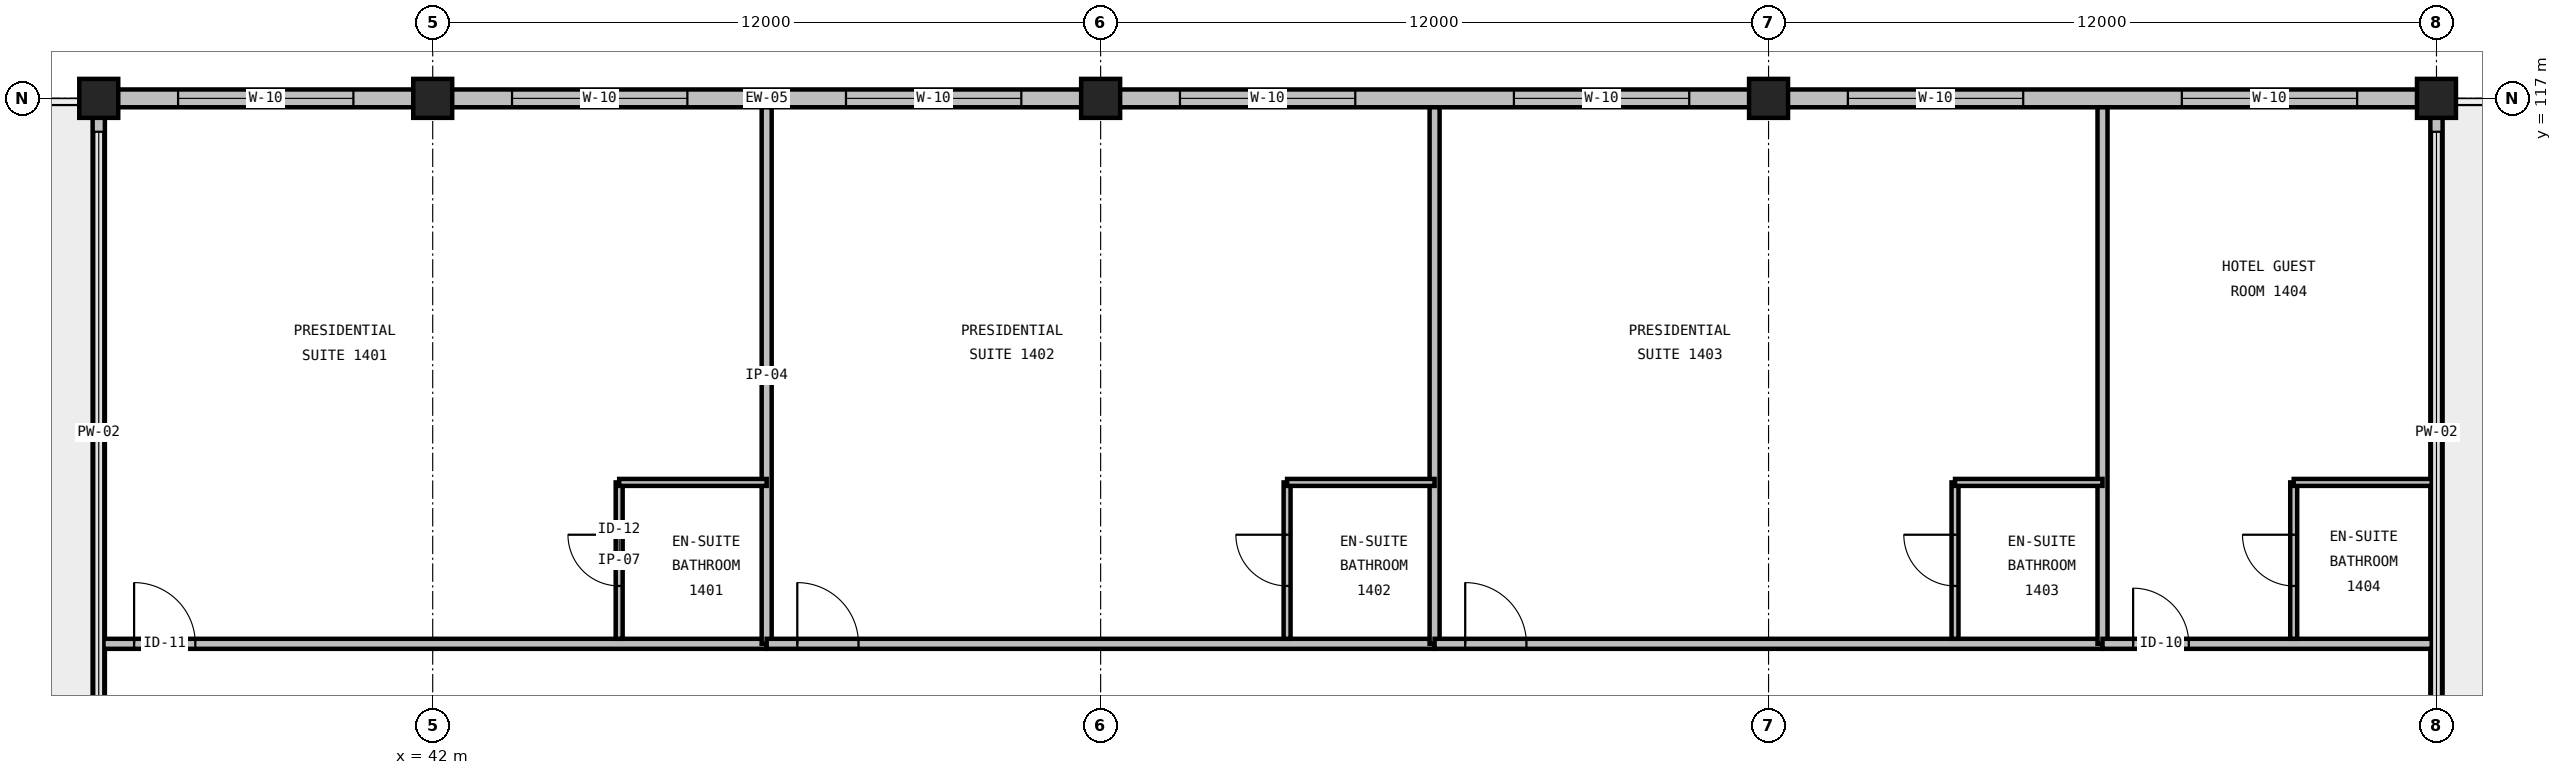
"""IFC4 building model, lengths in metres.
Left out: names, types, materials, properties, quantities, classifications, styles, units other than length and angle.
Written with IfcOpenShell. Run it as: python <this file> out.ifc"""

import sys

from ifc_helpers import new_model, si_unit, direction, frame, frame_2d, origin, origin_2d, place, context, subcontext, project, spatial, rectangle, extrude, element, fill, save


model = new_model("IFC4")
c1 = context("Model", 3, precision=1e-05, world=origin(), true_north=direction((0.0, 1.0)))
c2 = subcontext(c1, "Body", "Model", "MODEL_VIEW")
j1 = project(units=[si_unit("LENGTHUNIT", "METRE"), si_unit("PLANEANGLEUNIT", "RADIAN")], contexts=[c1])
p1 = place(None, origin())
s1 = spatial("IfcSite", under=j1, at=p1, CompositionType="ELEMENT")
p2 = place(p1, origin())
s2 = spatial("IfcBuilding", under=s1, at=p2, CompositionType="ELEMENT")
p3 = place(p2, frame((0.0, 0.0, 60.0)))
s3 = spatial("IfcBuildingStorey", under=s2, at=p3, CompositionType="ELEMENT", Elevation=60.0)
for number, where, z_axis, x_axis in (
    (1, (36.0, 117.0, 0.0), (0.0, 0.0, 1.0), (1.0, 0.0, 0.0)),
    (2, (42.0, 117.0, 0.0), (0.0, 0.0, 1.0), (1.0, 0.0, 0.0)),
    (3, (54.0, 117.0, 0.0), (0.0, 0.0, 1.0), (1.0, 0.0, 0.0)),
    (4, (66.0, 117.0, 0.0), (0.0, 0.0, 1.0), (1.0, 0.0, 0.0)),
    (5, (78.0, 117.0, 0.0), (0.0, 0.0, 1.0), (1.0, 0.0, 0.0)),
):
    element("IfcColumn", number, at=place(p3, frame(where, z_axis=z_axis, x_axis=x_axis)), inside=s3, PredefinedType="COLUMN", context=c2, shape_type="SweptSolid", body=[
        extrude(rectangle(XDim=0.7, YDim=0.7, at=origin_2d()), origin(), (0.0, 0.0, 1.0), 3.6),
    ])
p4 = place(p3, frame((42.0, 117.0, 0.0), z_axis=(0.0, 0.0, 1.0), x_axis=(-1.0, 0.0, 0.0)))
e6 = element("IfcWall", 6, at=p4, inside=s3, PredefinedType="STANDARD", context=c2, shape_type="SweptSolid", body=[
    extrude(rectangle(XDim=6.0, YDim=0.32, at=frame_2d((3.0, 0.0))), origin(), (0.0, 0.0, 1.0), 2.536),
])
p5 = place(p4, frame((1.425, 0.0, 0.65)))
e7 = element("IfcOpeningElement", 7, at=p5, cuts=e6, PredefinedType="OPENING", context=c2, shape_type="SweptSolid", body=[
    extrude(rectangle(XDim=3.15, YDim=1.75, at=frame_2d((1.575, 0.875))), frame((0.0, 0.175, 0.0), z_axis=(0.0, -1.0, 0.0), x_axis=(1.0, 0.0, 0.0)), (0.0, 0.0, 1.0), 0.35),
])
p6 = place(p3, frame((54.0, 117.0, 0.0), z_axis=(0.0, 0.0, 1.0), x_axis=(-1.0, 0.0, 0.0)))
e8 = element("IfcWall", 8, at=p6, inside=s3, PredefinedType="STANDARD", context=c2, shape_type="SweptSolid", body=[
    extrude(rectangle(XDim=12.0, YDim=0.32, at=frame_2d((6.0, 0.0))), origin(), (0.0, 0.0, 1.0), 2.536),
])
p7 = place(p6, frame((1.425, 0.0, 0.65)))
e9 = element("IfcOpeningElement", 9, at=p7, cuts=e8, PredefinedType="OPENING", context=c2, shape_type="SweptSolid", body=[
    extrude(rectangle(XDim=3.15, YDim=1.75, at=frame_2d((1.575, 0.875))), frame((0.0, 0.175, 0.0), z_axis=(0.0, -1.0, 0.0), x_axis=(1.0, 0.0, 0.0)), (0.0, 0.0, 1.0), 0.35),
])
p8 = place(p6, frame((7.425, 0.0, 0.65)))
e10 = element("IfcOpeningElement", 10, at=p8, cuts=e8, PredefinedType="OPENING", context=c2, shape_type="SweptSolid", body=[
    extrude(rectangle(XDim=3.15, YDim=1.75, at=frame_2d((1.575, 0.875))), frame((0.0, 0.175, 0.0), z_axis=(0.0, -1.0, 0.0), x_axis=(1.0, 0.0, 0.0)), (0.0, 0.0, 1.0), 0.35),
])
p9 = place(p3, frame((66.0, 117.0, 0.0), z_axis=(0.0, 0.0, 1.0), x_axis=(-1.0, 0.0, 0.0)))
e11 = element("IfcWall", 11, at=p9, inside=s3, PredefinedType="STANDARD", context=c2, shape_type="SweptSolid", body=[
    extrude(rectangle(XDim=12.0, YDim=0.32, at=frame_2d((6.0, 0.0))), origin(), (0.0, 0.0, 1.0), 2.536),
])
p10 = place(p9, frame((1.425, 0.0, 0.65)))
e12 = element("IfcOpeningElement", 12, at=p10, cuts=e11, PredefinedType="OPENING", context=c2, shape_type="SweptSolid", body=[
    extrude(rectangle(XDim=3.15, YDim=1.75, at=frame_2d((1.575, 0.875))), frame((0.0, 0.175, 0.0), z_axis=(0.0, -1.0, 0.0), x_axis=(1.0, 0.0, 0.0)), (0.0, 0.0, 1.0), 0.35),
])
p11 = place(p9, frame((7.425, 0.0, 0.65)))
e13 = element("IfcOpeningElement", 13, at=p11, cuts=e11, PredefinedType="OPENING", context=c2, shape_type="SweptSolid", body=[
    extrude(rectangle(XDim=3.15, YDim=1.75, at=frame_2d((1.575, 0.875))), frame((0.0, 0.175, 0.0), z_axis=(0.0, -1.0, 0.0), x_axis=(1.0, 0.0, 0.0)), (0.0, 0.0, 1.0), 0.35),
])
p12 = place(p3, frame((78.0, 117.0, 0.0), z_axis=(0.0, 0.0, 1.0), x_axis=(-1.0, 0.0, 0.0)))
e14 = element("IfcWall", 14, at=p12, inside=s3, PredefinedType="STANDARD", context=c2, shape_type="SweptSolid", body=[
    extrude(rectangle(XDim=12.0, YDim=0.32, at=frame_2d((6.0, 0.0))), origin(), (0.0, 0.0, 1.0), 2.536),
])
p13 = place(p12, frame((1.425, 0.0, 0.65)))
e15 = element("IfcOpeningElement", 15, at=p13, cuts=e14, PredefinedType="OPENING", context=c2, shape_type="SweptSolid", body=[
    extrude(rectangle(XDim=3.15, YDim=1.75, at=frame_2d((1.575, 0.875))), frame((0.0, 0.175, 0.0), z_axis=(0.0, -1.0, 0.0), x_axis=(1.0, 0.0, 0.0)), (0.0, 0.0, 1.0), 0.35),
])
p14 = place(p12, frame((7.425, 0.0, 0.65)))
e16 = element("IfcOpeningElement", 16, at=p14, cuts=e14, PredefinedType="OPENING", context=c2, shape_type="SweptSolid", body=[
    extrude(rectangle(XDim=3.15, YDim=1.75, at=frame_2d((1.575, 0.875))), frame((0.0, 0.175, 0.0), z_axis=(0.0, -1.0, 0.0), x_axis=(1.0, 0.0, 0.0)), (0.0, 0.0, 1.0), 0.35),
])
for number, where, z_axis, x_axis in (
    (17, (36.0, 117.0, 0.0), (0.0, 0.0, 1.0), (0.0, -1.0, 0.0)),
    (18, (78.0, 105.0, 0.0), (0.0, 0.0, 1.0), (0.0, 1.0, 0.0)),
):
    element("IfcWall", number, at=place(p3, frame(where, z_axis=z_axis, x_axis=x_axis)), inside=s3, PredefinedType="PARAPET", context=c2, shape_type="SweptSolid", body=[
        extrude(rectangle(XDim=12.0, YDim=0.22, at=frame_2d((6.0, 0.0))), origin(), (0.0, 0.0, 1.0), 0.2),
    ])
p15 = place(p3, frame((36.085, 107.2, 0.0), z_axis=(0.0, 0.0, 1.0), x_axis=(1.0, 0.0, 0.0)))
e19 = element("IfcWall", 19, at=p15, inside=s3, PredefinedType="PARTITIONING", context=c2, shape_type="SweptSolid", body=[
    extrude(rectangle(XDim=11.915, YDim=0.18, at=frame_2d((5.957, 0.0))), origin(), (0.0, 0.0, 1.0), 3.29),
])
p16 = place(p15, frame((0.55, 0.0, 0.0)))
e20 = element("IfcOpeningElement", 20, at=p16, cuts=e19, PredefinedType="OPENING", context=c2, shape_type="SweptSolid", body=[
    extrude(rectangle(XDim=1.1, YDim=2.2, at=frame_2d((0.55, 1.1))), frame((0.0, 0.105, 0.0), z_axis=(0.0, -1.0, 0.0), x_axis=(1.0, 0.0, 0.0)), (0.0, 0.0, 1.0), 0.21),
])
p17 = place(p3, frame((48.0, 107.2, 0.0), z_axis=(0.0, 0.0, 1.0), x_axis=(0.0, 1.0, 0.0)))
e21 = element("IfcWall", 21, at=p17, inside=s3, PredefinedType="PARTITIONING", context=c2, shape_type="SweptSolid", body=[
    extrude(rectangle(XDim=9.64, YDim=0.18, at=frame_2d((4.82, 0.0))), origin(), (0.0, 0.0, 1.0), 3.29),
])
p18 = place(p3, frame((45.35, 107.29, 0.0), z_axis=(0.0, 0.0, 1.0), x_axis=(0.0, 1.0, 0.0)))
e22 = element("IfcWall", 22, at=p18, inside=s3, PredefinedType="PARTITIONING", context=c2, shape_type="SweptSolid", body=[
    extrude(rectangle(XDim=2.81, YDim=0.125, at=frame_2d((1.405, 0.0))), origin(), (0.0, 0.0, 1.0), 3.29),
])
p19 = place(p18, frame((0.95, 0.0, 0.0)))
e23 = element("IfcOpeningElement", 23, at=p19, cuts=e22, PredefinedType="OPENING", context=c2, shape_type="SweptSolid", body=[
    extrude(rectangle(XDim=0.92, YDim=2.1, at=frame_2d((0.46, 1.05))), frame((0.0, 0.077, 0.0), z_axis=(0.0, -1.0, 0.0), x_axis=(1.0, 0.0, 0.0)), (0.0, 0.0, 1.0), 0.155),
])
p20 = place(p3, frame((45.35, 110.1, 0.0), z_axis=(0.0, 0.0, 1.0), x_axis=(1.0, 0.0, 0.0)))
e24 = element("IfcWall", 24, at=p20, inside=s3, PredefinedType="PARTITIONING", context=c2, shape_type="SweptSolid", body=[
    extrude(rectangle(XDim=2.65, YDim=0.125, at=frame_2d((1.325, 0.0))), origin(), (0.0, 0.0, 1.0), 3.29),
])
p21 = place(p3, frame((48.0, 107.2, 0.0), z_axis=(0.0, 0.0, 1.0), x_axis=(1.0, 0.0, 0.0)))
e25 = element("IfcWall", 25, at=p21, inside=s3, PredefinedType="PARTITIONING", context=c2, shape_type="SweptSolid", body=[
    extrude(rectangle(XDim=12.0, YDim=0.18, at=frame_2d((6.0, 0.0))), origin(), (0.0, 0.0, 1.0), 3.29),
])
p22 = place(p21, frame((0.55, 0.0, 0.0)))
e26 = element("IfcOpeningElement", 26, at=p22, cuts=e25, PredefinedType="OPENING", context=c2, shape_type="SweptSolid", body=[
    extrude(rectangle(XDim=1.1, YDim=2.2, at=frame_2d((0.55, 1.1))), frame((0.0, 0.105, 0.0), z_axis=(0.0, -1.0, 0.0), x_axis=(1.0, 0.0, 0.0)), (0.0, 0.0, 1.0), 0.21),
])
p23 = place(p3, frame((60.0, 107.2, 0.0), z_axis=(0.0, 0.0, 1.0), x_axis=(0.0, 1.0, 0.0)))
e27 = element("IfcWall", 27, at=p23, inside=s3, PredefinedType="PARTITIONING", context=c2, shape_type="SweptSolid", body=[
    extrude(rectangle(XDim=9.64, YDim=0.18, at=frame_2d((4.82, 0.0))), origin(), (0.0, 0.0, 1.0), 3.29),
])
p24 = place(p3, frame((57.35, 107.29, 0.0), z_axis=(0.0, 0.0, 1.0), x_axis=(0.0, 1.0, 0.0)))
e28 = element("IfcWall", 28, at=p24, inside=s3, PredefinedType="PARTITIONING", context=c2, shape_type="SweptSolid", body=[
    extrude(rectangle(XDim=2.81, YDim=0.125, at=frame_2d((1.405, 0.0))), origin(), (0.0, 0.0, 1.0), 3.29),
])
p25 = place(p24, frame((0.95, 0.0, 0.0)))
e29 = element("IfcOpeningElement", 29, at=p25, cuts=e28, PredefinedType="OPENING", context=c2, shape_type="SweptSolid", body=[
    extrude(rectangle(XDim=0.92, YDim=2.1, at=frame_2d((0.46, 1.05))), frame((0.0, 0.077, 0.0), z_axis=(0.0, -1.0, 0.0), x_axis=(1.0, 0.0, 0.0)), (0.0, 0.0, 1.0), 0.155),
])
p26 = place(p3, frame((57.35, 110.1, 0.0), z_axis=(0.0, 0.0, 1.0), x_axis=(1.0, 0.0, 0.0)))
e30 = element("IfcWall", 30, at=p26, inside=s3, PredefinedType="PARTITIONING", context=c2, shape_type="SweptSolid", body=[
    extrude(rectangle(XDim=2.65, YDim=0.125, at=frame_2d((1.325, 0.0))), origin(), (0.0, 0.0, 1.0), 3.29),
])
p27 = place(p3, frame((60.0, 107.2, 0.0), z_axis=(0.0, 0.0, 1.0), x_axis=(1.0, 0.0, 0.0)))
e31 = element("IfcWall", 31, at=p27, inside=s3, PredefinedType="PARTITIONING", context=c2, shape_type="SweptSolid", body=[
    extrude(rectangle(XDim=12.0, YDim=0.18, at=frame_2d((6.0, 0.0))), origin(), (0.0, 0.0, 1.0), 3.29),
])
p28 = place(p27, frame((0.55, 0.0, 0.0)))
e32 = element("IfcOpeningElement", 32, at=p28, cuts=e31, PredefinedType="OPENING", context=c2, shape_type="SweptSolid", body=[
    extrude(rectangle(XDim=1.1, YDim=2.2, at=frame_2d((0.55, 1.1))), frame((0.0, 0.105, 0.0), z_axis=(0.0, -1.0, 0.0), x_axis=(1.0, 0.0, 0.0)), (0.0, 0.0, 1.0), 0.21),
])
p29 = place(p3, frame((72.0, 107.2, 0.0), z_axis=(0.0, 0.0, 1.0), x_axis=(0.0, 1.0, 0.0)))
e33 = element("IfcWall", 33, at=p29, inside=s3, PredefinedType="PARTITIONING", context=c2, shape_type="SweptSolid", body=[
    extrude(rectangle(XDim=9.64, YDim=0.18, at=frame_2d((4.82, 0.0))), origin(), (0.0, 0.0, 1.0), 3.29),
])
p30 = place(p3, frame((69.35, 107.29, 0.0), z_axis=(0.0, 0.0, 1.0), x_axis=(0.0, 1.0, 0.0)))
e34 = element("IfcWall", 34, at=p30, inside=s3, PredefinedType="PARTITIONING", context=c2, shape_type="SweptSolid", body=[
    extrude(rectangle(XDim=2.81, YDim=0.125, at=frame_2d((1.405, 0.0))), origin(), (0.0, 0.0, 1.0), 3.29),
])
p31 = place(p30, frame((0.95, 0.0, 0.0)))
e35 = element("IfcOpeningElement", 35, at=p31, cuts=e34, PredefinedType="OPENING", context=c2, shape_type="SweptSolid", body=[
    extrude(rectangle(XDim=0.92, YDim=2.1, at=frame_2d((0.46, 1.05))), frame((0.0, 0.077, 0.0), z_axis=(0.0, -1.0, 0.0), x_axis=(1.0, 0.0, 0.0)), (0.0, 0.0, 1.0), 0.155),
])
p32 = place(p3, frame((69.35, 110.1, 0.0), z_axis=(0.0, 0.0, 1.0), x_axis=(1.0, 0.0, 0.0)))
e36 = element("IfcWall", 36, at=p32, inside=s3, PredefinedType="PARTITIONING", context=c2, shape_type="SweptSolid", body=[
    extrude(rectangle(XDim=2.65, YDim=0.125, at=frame_2d((1.325, 0.0))), origin(), (0.0, 0.0, 1.0), 3.29),
])
p33 = place(p3, frame((72.0, 107.2, 0.0), z_axis=(0.0, 0.0, 1.0), x_axis=(1.0, 0.0, 0.0)))
e37 = element("IfcWall", 37, at=p33, inside=s3, PredefinedType="PARTITIONING", context=c2, shape_type="SweptSolid", body=[
    extrude(rectangle(XDim=5.915, YDim=0.18, at=frame_2d((2.957, 0.0))), origin(), (0.0, 0.0, 1.0), 3.29),
])
p34 = place(p33, frame((0.55, 0.0, 0.0)))
e38 = element("IfcOpeningElement", 38, at=p34, cuts=e37, PredefinedType="OPENING", context=c2, shape_type="SweptSolid", body=[
    extrude(rectangle(XDim=1.0, YDim=2.15, at=frame_2d((0.5, 1.075))), frame((0.0, 0.105, 0.0), z_axis=(0.0, -1.0, 0.0), x_axis=(1.0, 0.0, 0.0)), (0.0, 0.0, 1.0), 0.21),
])
p35 = place(p3, frame((75.435, 107.29, 0.0), z_axis=(0.0, 0.0, 1.0), x_axis=(0.0, 1.0, 0.0)))
e39 = element("IfcWall", 39, at=p35, inside=s3, PredefinedType="PARTITIONING", context=c2, shape_type="SweptSolid", body=[
    extrude(rectangle(XDim=2.81, YDim=0.125, at=frame_2d((1.405, 0.0))), origin(), (0.0, 0.0, 1.0), 3.29),
])
p36 = place(p35, frame((0.95, 0.0, 0.0)))
e40 = element("IfcOpeningElement", 40, at=p36, cuts=e39, PredefinedType="OPENING", context=c2, shape_type="SweptSolid", body=[
    extrude(rectangle(XDim=0.92, YDim=2.1, at=frame_2d((0.46, 1.05))), frame((0.0, 0.077, 0.0), z_axis=(0.0, -1.0, 0.0), x_axis=(1.0, 0.0, 0.0)), (0.0, 0.0, 1.0), 0.155),
])
p37 = place(p3, frame((75.435, 110.1, 0.0), z_axis=(0.0, 0.0, 1.0), x_axis=(1.0, 0.0, 0.0)))
e41 = element("IfcWall", 41, at=p37, inside=s3, PredefinedType="PARTITIONING", context=c2, shape_type="SweptSolid", body=[
    extrude(rectangle(XDim=2.48, YDim=0.125, at=frame_2d((1.24, 0.0))), origin(), (0.0, 0.0, 1.0), 3.29),
])
p38 = place(p5, origin())
e42 = element("IfcWindow", 42, at=p38, inside=s3, PartitioningType="TRIPLE_PANEL_VERTICAL", PredefinedType="WINDOW", context=c2, shape_type="SweptSolid", body=[
    extrude(rectangle(XDim=3.15, YDim=1.75, at=frame_2d((1.575, 0.875))), frame((0.0, 0.03, 0.0), z_axis=(0.0, -1.0, 0.0), x_axis=(1.0, 0.0, 0.0)), (0.0, 0.0, 1.0), 0.06),
])
fill(e7, e42)
p39 = place(p7, origin())
e43 = element("IfcWindow", 43, at=p39, inside=s3, PartitioningType="TRIPLE_PANEL_VERTICAL", PredefinedType="WINDOW", context=c2, shape_type="SweptSolid", body=[
    extrude(rectangle(XDim=3.15, YDim=1.75, at=frame_2d((1.575, 0.875))), frame((0.0, 0.03, 0.0), z_axis=(0.0, -1.0, 0.0), x_axis=(1.0, 0.0, 0.0)), (0.0, 0.0, 1.0), 0.06),
])
fill(e9, e43)
p40 = place(p8, origin())
e44 = element("IfcWindow", 44, at=p40, inside=s3, PartitioningType="TRIPLE_PANEL_VERTICAL", PredefinedType="WINDOW", context=c2, shape_type="SweptSolid", body=[
    extrude(rectangle(XDim=3.15, YDim=1.75, at=frame_2d((1.575, 0.875))), frame((0.0, 0.03, 0.0), z_axis=(0.0, -1.0, 0.0), x_axis=(1.0, 0.0, 0.0)), (0.0, 0.0, 1.0), 0.06),
])
fill(e10, e44)
p41 = place(p10, origin())
e45 = element("IfcWindow", 45, at=p41, inside=s3, PartitioningType="TRIPLE_PANEL_VERTICAL", PredefinedType="WINDOW", context=c2, shape_type="SweptSolid", body=[
    extrude(rectangle(XDim=3.15, YDim=1.75, at=frame_2d((1.575, 0.875))), frame((0.0, 0.03, 0.0), z_axis=(0.0, -1.0, 0.0), x_axis=(1.0, 0.0, 0.0)), (0.0, 0.0, 1.0), 0.06),
])
fill(e12, e45)
p42 = place(p11, origin())
e46 = element("IfcWindow", 46, at=p42, inside=s3, PartitioningType="TRIPLE_PANEL_VERTICAL", PredefinedType="WINDOW", context=c2, shape_type="SweptSolid", body=[
    extrude(rectangle(XDim=3.15, YDim=1.75, at=frame_2d((1.575, 0.875))), frame((0.0, 0.03, 0.0), z_axis=(0.0, -1.0, 0.0), x_axis=(1.0, 0.0, 0.0)), (0.0, 0.0, 1.0), 0.06),
])
fill(e13, e46)
p43 = place(p13, origin())
e47 = element("IfcWindow", 47, at=p43, inside=s3, PartitioningType="TRIPLE_PANEL_VERTICAL", PredefinedType="WINDOW", context=c2, shape_type="SweptSolid", body=[
    extrude(rectangle(XDim=3.15, YDim=1.75, at=frame_2d((1.575, 0.875))), frame((0.0, 0.03, 0.0), z_axis=(0.0, -1.0, 0.0), x_axis=(1.0, 0.0, 0.0)), (0.0, 0.0, 1.0), 0.06),
])
fill(e15, e47)
p44 = place(p14, origin())
e48 = element("IfcWindow", 48, at=p44, inside=s3, PartitioningType="TRIPLE_PANEL_VERTICAL", PredefinedType="WINDOW", context=c2, shape_type="SweptSolid", body=[
    extrude(rectangle(XDim=3.15, YDim=1.75, at=frame_2d((1.575, 0.875))), frame((0.0, 0.03, 0.0), z_axis=(0.0, -1.0, 0.0), x_axis=(1.0, 0.0, 0.0)), (0.0, 0.0, 1.0), 0.06),
])
fill(e16, e48)
p45 = place(p16, origin())
e49 = element("IfcDoor", 49, at=p45, inside=s3, OperationType="SINGLE_SWING_LEFT", PredefinedType="DOOR", context=c2, shape_type="SweptSolid", body=[
    extrude(rectangle(XDim=1.1, YDim=2.2, at=frame_2d((0.55, 1.1))), frame((0.0, 0.025, 0.0), z_axis=(0.0, -1.0, 0.0), x_axis=(1.0, 0.0, 0.0)), (0.0, 0.0, 1.0), 0.05),
])
fill(e20, e49)
p46 = place(p19, origin())
e50 = element("IfcDoor", 50, at=p46, inside=s3, OperationType="SINGLE_SWING_RIGHT", PredefinedType="DOOR", context=c2, shape_type="SweptSolid", body=[
    extrude(rectangle(XDim=0.92, YDim=2.1, at=frame_2d((0.46, 1.05))), frame((0.0, 0.025, 0.0), z_axis=(0.0, -1.0, 0.0), x_axis=(1.0, 0.0, 0.0)), (0.0, 0.0, 1.0), 0.05),
])
fill(e23, e50)
p47 = place(p22, origin())
e51 = element("IfcDoor", 51, at=p47, inside=s3, OperationType="SINGLE_SWING_LEFT", PredefinedType="DOOR", context=c2, shape_type="SweptSolid", body=[
    extrude(rectangle(XDim=1.1, YDim=2.2, at=frame_2d((0.55, 1.1))), frame((0.0, 0.025, 0.0), z_axis=(0.0, -1.0, 0.0), x_axis=(1.0, 0.0, 0.0)), (0.0, 0.0, 1.0), 0.05),
])
fill(e26, e51)
p48 = place(p25, origin())
e52 = element("IfcDoor", 52, at=p48, inside=s3, OperationType="SINGLE_SWING_RIGHT", PredefinedType="DOOR", context=c2, shape_type="SweptSolid", body=[
    extrude(rectangle(XDim=0.92, YDim=2.1, at=frame_2d((0.46, 1.05))), frame((0.0, 0.025, 0.0), z_axis=(0.0, -1.0, 0.0), x_axis=(1.0, 0.0, 0.0)), (0.0, 0.0, 1.0), 0.05),
])
fill(e29, e52)
p49 = place(p28, origin())
e53 = element("IfcDoor", 53, at=p49, inside=s3, OperationType="SINGLE_SWING_LEFT", PredefinedType="DOOR", context=c2, shape_type="SweptSolid", body=[
    extrude(rectangle(XDim=1.1, YDim=2.2, at=frame_2d((0.55, 1.1))), frame((0.0, 0.025, 0.0), z_axis=(0.0, -1.0, 0.0), x_axis=(1.0, 0.0, 0.0)), (0.0, 0.0, 1.0), 0.05),
])
fill(e32, e53)
p50 = place(p31, origin())
e54 = element("IfcDoor", 54, at=p50, inside=s3, OperationType="SINGLE_SWING_RIGHT", PredefinedType="DOOR", context=c2, shape_type="SweptSolid", body=[
    extrude(rectangle(XDim=0.92, YDim=2.1, at=frame_2d((0.46, 1.05))), frame((0.0, 0.025, 0.0), z_axis=(0.0, -1.0, 0.0), x_axis=(1.0, 0.0, 0.0)), (0.0, 0.0, 1.0), 0.05),
])
fill(e35, e54)
p51 = place(p34, origin())
e55 = element("IfcDoor", 55, at=p51, inside=s3, OperationType="SINGLE_SWING_LEFT", PredefinedType="DOOR", context=c2, shape_type="SweptSolid", body=[
    extrude(rectangle(XDim=1.0, YDim=2.15, at=frame_2d((0.5, 1.075))), frame((0.0, 0.025, 0.0), z_axis=(0.0, -1.0, 0.0), x_axis=(1.0, 0.0, 0.0)), (0.0, 0.0, 1.0), 0.05),
])
fill(e38, e55)
p52 = place(p36, origin())
e56 = element("IfcDoor", 56, at=p52, inside=s3, OperationType="SINGLE_SWING_RIGHT", PredefinedType="DOOR", context=c2, shape_type="SweptSolid", body=[
    extrude(rectangle(XDim=0.92, YDim=2.1, at=frame_2d((0.46, 1.05))), frame((0.0, 0.025, 0.0), z_axis=(0.0, -1.0, 0.0), x_axis=(1.0, 0.0, 0.0)), (0.0, 0.0, 1.0), 0.05),
])
fill(e40, e56)
save(model, sys.argv[1])
